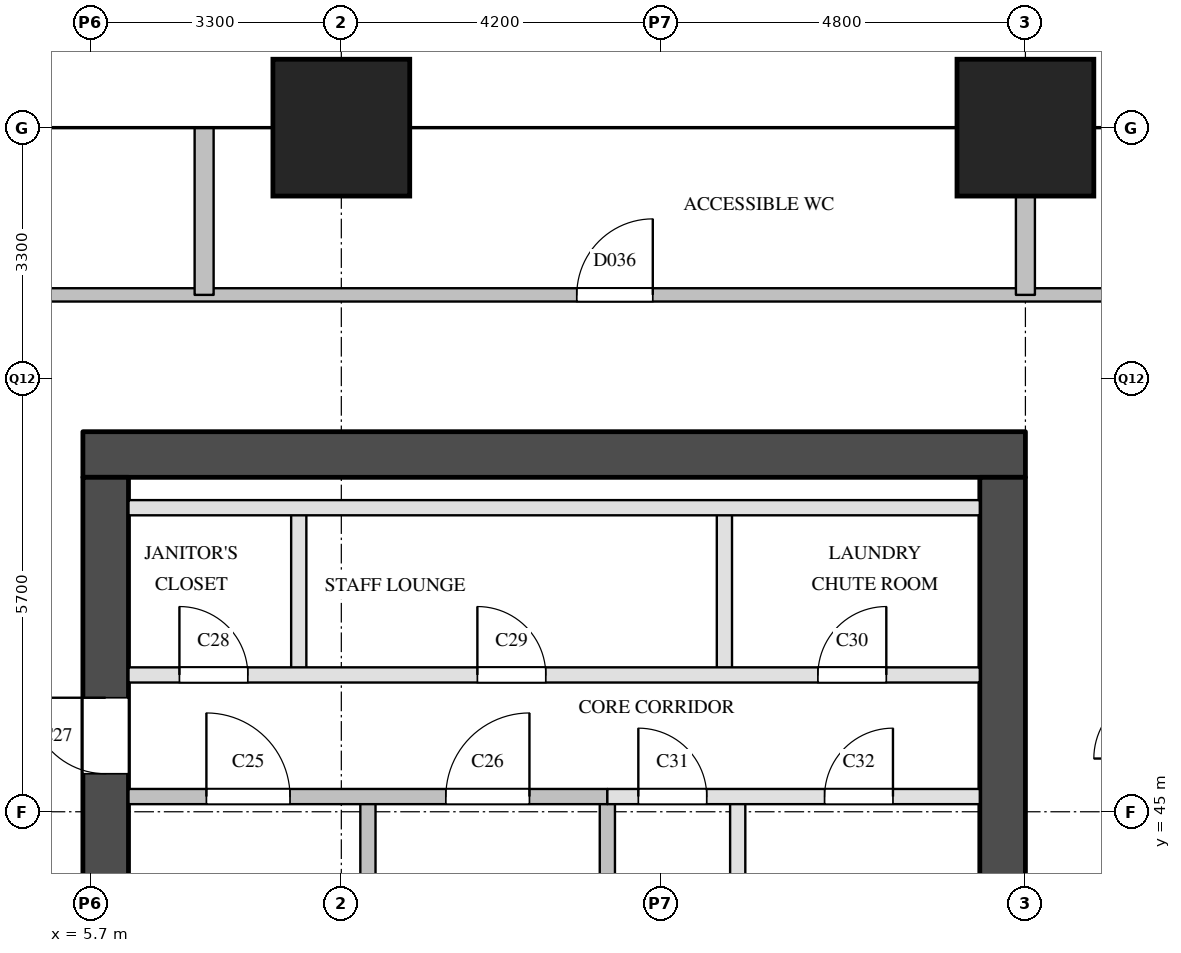
"""IFC4 building model, lengths in metres.
Left out: names, types, materials, properties, quantities, classifications, styles, units other than length and angle.
Written with IfcOpenShell. Run it as: python <this file> out.ifc"""

import sys

from ifc_helpers import new_model, si_unit, direction, frame, frame_2d, origin, origin_2d, place, context, subcontext, project, spatial, rectangle, extrude, element, fill, save


model = new_model("IFC4")
c1 = context("Model", 3, precision=1e-05, world=origin(), true_north=direction((0.0, 1.0)))
c2 = subcontext(c1, "Body", "Model", "MODEL_VIEW")
j1 = project(units=[si_unit("LENGTHUNIT", "METRE"), si_unit("PLANEANGLEUNIT", "RADIAN")], contexts=[c1])
p1 = place(None, origin())
s1 = spatial("IfcSite", under=j1, at=p1, CompositionType="ELEMENT")
p2 = place(p1, origin())
s2 = spatial("IfcBuilding", under=s1, at=p2, CompositionType="ELEMENT")
p3 = place(p2, frame((0.0, 0.0, 112.0)))
s3 = spatial("IfcBuildingStorey", under=s2, at=p3, CompositionType="ELEMENT", Elevation=112.0)
for number, where, z_axis, x_axis in (
    (1, (9.0, 54.0, 0.0), (0.0, 0.0, 1.0), (1.0, 0.0, 0.0)),
    (2, (18.0, 54.0, 0.0), (0.0, 0.0, 1.0), (1.0, 0.0, 0.0)),
):
    element("IfcColumn", number, at=place(p3, frame(where, z_axis=z_axis, x_axis=x_axis)), inside=s3, PredefinedType="COLUMN", context=c2, shape_type="SweptSolid", body=[
        extrude(rectangle(XDim=1.8, YDim=1.8, at=origin_2d()), origin(), (0.0, 0.0, 1.0), 3.8),
    ])
p4 = place(p3, frame((5.6, 49.7, 0.0), z_axis=(0.0, 0.0, 1.0), x_axis=(1.0, 0.0, 0.0)))
e3 = element("IfcWall", 3, at=p4, inside=s3, PredefinedType="SHEAR", context=c2, shape_type="SweptSolid", body=[
    extrude(rectangle(XDim=12.4, YDim=0.6, at=frame_2d((6.2, 0.0))), origin(), (0.0, 0.0, 1.0), 3.5),
])
p5 = place(p3, frame((5.9, 29.1, 0.0), z_axis=(0.0, 0.0, 1.0), x_axis=(0.0, 1.0, 0.0)))
e4 = element("IfcWall", 4, at=p5, inside=s3, PredefinedType="SHEAR", context=c2, shape_type="SweptSolid", body=[
    extrude(rectangle(XDim=20.3, YDim=0.6, at=frame_2d((10.15, 0.0))), origin(), (0.0, 0.0, 1.0), 3.5),
])
p6 = place(p5, frame((3.6, 0.0, 0.0)))
e5 = element("IfcOpeningElement", 5, at=p6, cuts=e4, PredefinedType="OPENING", context=c2, shape_type="SweptSolid", body=[
    extrude(rectangle(XDim=1.8, YDim=2.1, at=frame_2d((0.9, 1.05))), frame((0.0, 0.31, 0.0), z_axis=(0.0, -1.0, 0.0), x_axis=(1.0, 0.0, 0.0)), (0.0, 0.0, 1.0), 0.62),
])
p7 = place(p5, frame((16.4, 0.0, 0.0)))
e6 = element("IfcOpeningElement", 6, at=p7, cuts=e4, PredefinedType="OPENING", context=c2, shape_type="SweptSolid", body=[
    extrude(rectangle(XDim=1.0, YDim=2.1, at=frame_2d((0.5, 1.05))), frame((0.0, 0.31, 0.0), z_axis=(0.0, -1.0, 0.0), x_axis=(1.0, 0.0, 0.0)), (0.0, 0.0, 1.0), 0.62),
])
p8 = place(p3, frame((17.7, 29.1, 0.0), z_axis=(0.0, 0.0, 1.0), x_axis=(0.0, 1.0, 0.0)))
e7 = element("IfcWall", 7, at=p8, inside=s3, PredefinedType="SHEAR", context=c2, shape_type="SweptSolid", body=[
    extrude(rectangle(XDim=20.3, YDim=0.6, at=frame_2d((10.15, 0.0))), origin(), (0.0, 0.0, 1.0), 3.5),
])
p9 = place(p8, frame((1.25, 0.0, 0.0)))
e8 = element("IfcOpeningElement", 8, at=p9, cuts=e7, PredefinedType="OPENING", context=c2, shape_type="SweptSolid", body=[
    extrude(rectangle(XDim=0.7, YDim=2.1, at=frame_2d((0.35, 1.05))), frame((0.0, 0.31, 0.0), z_axis=(0.0, -1.0, 0.0), x_axis=(1.0, 0.0, 0.0)), (0.0, 0.0, 1.0), 0.62),
])
p10 = place(p8, frame((7.05, 0.0, 0.0)))
e9 = element("IfcOpeningElement", 9, at=p10, cuts=e7, PredefinedType="OPENING", context=c2, shape_type="SweptSolid", body=[
    extrude(rectangle(XDim=0.7, YDim=2.1, at=frame_2d((0.35, 1.05))), frame((0.0, 0.31, 0.0), z_axis=(0.0, -1.0, 0.0), x_axis=(1.0, 0.0, 0.0)), (0.0, 0.0, 1.0), 0.62),
])
p11 = place(p3, frame((8.44, 46.8, 0.0), z_axis=(0.0, 0.0, 1.0), x_axis=(0.0, 1.0, 0.0)))
e10 = element("IfcWall", 10, at=p11, inside=s3, PredefinedType="PARTITIONING", context=c2, shape_type="SweptSolid", body=[
    extrude(rectangle(XDim=2.2, YDim=0.2, at=frame_2d((1.1, 0.0))), origin(), (0.0, 0.0, 1.0), 3.5),
])
for number, where, z_axis, x_axis in (
    (11, (9.35, 40.9, 0.0), (0.0, 0.0, 1.0), (0.0, 1.0, 0.0)),
    (12, (12.5, 40.9, 0.0), (0.0, 0.0, 1.0), (0.0, 1.0, 0.0)),
):
    element("IfcWall", number, at=place(p3, frame(where, z_axis=z_axis, x_axis=x_axis)), inside=s3, PredefinedType="SOLIDWALL", context=c2, shape_type="SweptSolid", body=[
        extrude(rectangle(XDim=4.3, YDim=0.2, at=frame_2d((2.15, 0.0))), origin(), (0.0, 0.0, 1.0), 3.5),
    ])
p12 = place(p3, frame((14.04, 46.8, 0.0), z_axis=(0.0, 0.0, 1.0), x_axis=(0.0, 1.0, 0.0)))
e13 = element("IfcWall", 13, at=p12, inside=s3, PredefinedType="PARTITIONING", context=c2, shape_type="SweptSolid", body=[
    extrude(rectangle(XDim=2.2, YDim=0.2, at=frame_2d((1.1, 0.0))), origin(), (0.0, 0.0, 1.0), 3.5),
])
p13 = place(p3, frame((14.215, 39.0, 0.0), z_axis=(0.0, 0.0, 1.0), x_axis=(0.0, 1.0, 0.0)))
e14 = element("IfcWall", 14, at=p13, inside=s3, PredefinedType="PARTITIONING", context=c2, shape_type="SweptSolid", body=[
    extrude(rectangle(XDim=6.2, YDim=0.2, at=frame_2d((3.1, 0.0))), origin(), (0.0, 0.0, 1.0), 3.5),
])
p14 = place(p3, frame((12.5, 45.2, 0.0), z_axis=(0.0, 0.0, 1.0), x_axis=(1.0, 0.0, 0.0)))
e15 = element("IfcWall", 15, at=p14, inside=s3, PredefinedType="PARTITIONING", context=c2, shape_type="SweptSolid", body=[
    extrude(rectangle(XDim=4.9, YDim=0.2, at=frame_2d((2.45, 0.0))), origin(), (0.0, 0.0, 1.0), 3.5),
])
p15 = place(p14, frame((0.407, 0.0, 0.0)))
e16 = element("IfcOpeningElement", 16, at=p15, cuts=e15, PredefinedType="OPENING", context=c2, shape_type="SweptSolid", body=[
    extrude(rectangle(XDim=0.9, YDim=2.1, at=frame_2d((0.45, 1.05))), frame((0.0, 0.11, 0.0), z_axis=(0.0, -1.0, 0.0), x_axis=(1.0, 0.0, 0.0)), (0.0, 0.0, 1.0), 0.22),
])
p16 = place(p14, frame((2.857, 0.0, 0.0)))
e17 = element("IfcOpeningElement", 17, at=p16, cuts=e15, PredefinedType="OPENING", context=c2, shape_type="SweptSolid", body=[
    extrude(rectangle(XDim=0.9, YDim=2.1, at=frame_2d((0.45, 1.05))), frame((0.0, 0.11, 0.0), z_axis=(0.0, -1.0, 0.0), x_axis=(1.0, 0.0, 0.0)), (0.0, 0.0, 1.0), 0.22),
])
p17 = place(p3, frame((6.2, 45.2, 0.0), z_axis=(0.0, 0.0, 1.0), x_axis=(1.0, 0.0, 0.0)))
e18 = element("IfcWall", 18, at=p17, inside=s3, PredefinedType="SOLIDWALL", context=c2, shape_type="SweptSolid", body=[
    extrude(rectangle(XDim=6.3, YDim=0.2, at=frame_2d((3.15, 0.0))), origin(), (0.0, 0.0, 1.0), 3.5),
])
p18 = place(p17, frame((1.025, 0.0, 0.0)))
e19 = element("IfcOpeningElement", 19, at=p18, cuts=e18, PredefinedType="OPENING", context=c2, shape_type="SweptSolid", body=[
    extrude(rectangle(XDim=1.1, YDim=2.1, at=frame_2d((0.55, 1.05))), frame((0.0, 0.11, 0.0), z_axis=(0.0, -1.0, 0.0), x_axis=(1.0, 0.0, 0.0)), (0.0, 0.0, 1.0), 0.22),
])
p19 = place(p17, frame((4.175, 0.0, 0.0)))
e20 = element("IfcOpeningElement", 20, at=p19, cuts=e18, PredefinedType="OPENING", context=c2, shape_type="SweptSolid", body=[
    extrude(rectangle(XDim=1.1, YDim=2.1, at=frame_2d((0.55, 1.05))), frame((0.0, 0.11, 0.0), z_axis=(0.0, -1.0, 0.0), x_axis=(1.0, 0.0, 0.0)), (0.0, 0.0, 1.0), 0.22),
])
p20 = place(p3, frame((6.2, 46.8, 0.0), z_axis=(0.0, 0.0, 1.0), x_axis=(1.0, 0.0, 0.0)))
e21 = element("IfcWall", 21, at=p20, inside=s3, PredefinedType="PARTITIONING", context=c2, shape_type="SweptSolid", body=[
    extrude(rectangle(XDim=11.2, YDim=0.2, at=frame_2d((5.6, 0.0))), origin(), (0.0, 0.0, 1.0), 3.5),
])
p21 = place(p20, frame((0.67, 0.0, 0.0)))
e22 = element("IfcOpeningElement", 22, at=p21, cuts=e21, PredefinedType="OPENING", context=c2, shape_type="SweptSolid", body=[
    extrude(rectangle(XDim=0.9, YDim=2.1, at=frame_2d((0.45, 1.05))), frame((0.0, 0.11, 0.0), z_axis=(0.0, -1.0, 0.0), x_axis=(1.0, 0.0, 0.0)), (0.0, 0.0, 1.0), 0.22),
])
p22 = place(p20, frame((4.59, 0.0, 0.0)))
e23 = element("IfcOpeningElement", 23, at=p22, cuts=e21, PredefinedType="OPENING", context=c2, shape_type="SweptSolid", body=[
    extrude(rectangle(XDim=0.9, YDim=2.1, at=frame_2d((0.45, 1.05))), frame((0.0, 0.11, 0.0), z_axis=(0.0, -1.0, 0.0), x_axis=(1.0, 0.0, 0.0)), (0.0, 0.0, 1.0), 0.22),
])
p23 = place(p20, frame((9.07, 0.0, 0.0)))
e24 = element("IfcOpeningElement", 24, at=p23, cuts=e21, PredefinedType="OPENING", context=c2, shape_type="SweptSolid", body=[
    extrude(rectangle(XDim=0.9, YDim=2.1, at=frame_2d((0.45, 1.05))), frame((0.0, 0.11, 0.0), z_axis=(0.0, -1.0, 0.0), x_axis=(1.0, 0.0, 0.0)), (0.0, 0.0, 1.0), 0.22),
])
p24 = place(p3, frame((6.2, 49.0, 0.0), z_axis=(0.0, 0.0, 1.0), x_axis=(1.0, 0.0, 0.0)))
e25 = element("IfcWall", 25, at=p24, inside=s3, PredefinedType="PARTITIONING", context=c2, shape_type="SweptSolid", body=[
    extrude(rectangle(XDim=11.2, YDim=0.2, at=frame_2d((5.6, 0.0))), origin(), (0.0, 0.0, 1.0), 3.5),
])
p25 = place(p3, frame((3.8, 51.8, 0.0), z_axis=(0.0, 0.0, 1.0), x_axis=(1.0, 0.0, 0.0)))
e26 = element("IfcWall", 26, at=p25, inside=s3, PredefinedType="PARTITIONING", context=c2, shape_type="SweptSolid", body=[
    extrude(rectangle(XDim=16.0, YDim=0.175, at=frame_2d((8.0, 0.0))), origin(), (0.0, 0.0, 1.0), 3.5),
])
p26 = place(p25, frame((8.298, 0.0, 0.0)))
e27 = element("IfcOpeningElement", 27, at=p26, cuts=e26, PredefinedType="OPENING", context=c2, shape_type="SweptSolid", body=[
    extrude(rectangle(XDim=1.0, YDim=2.1, at=frame_2d((0.5, 1.05))), frame((0.0, 0.097, 0.0), z_axis=(0.0, -1.0, 0.0), x_axis=(1.0, 0.0, 0.0)), (0.0, 0.0, 1.0), 0.195),
])
p27 = place(p3, frame((7.195, 51.8, 0.0), z_axis=(0.0, 0.0, 1.0), x_axis=(0.0, 1.0, 0.0)))
e28 = element("IfcWall", 28, at=p27, inside=s3, PredefinedType="PARTITIONING", context=c2, shape_type="SweptSolid", body=[
    extrude(rectangle(XDim=2.2, YDim=0.25, at=frame_2d((1.1, 0.0))), origin(), (0.0, 0.0, 1.0), 2.5),
])
p28 = place(p3, frame((18.0, 51.8, 0.0), z_axis=(0.0, 0.0, 1.0), x_axis=(0.0, 1.0, 0.0)))
e29 = element("IfcWall", 29, at=p28, inside=s3, PredefinedType="PARTITIONING", context=c2, shape_type="SweptSolid", body=[
    extrude(rectangle(XDim=2.2, YDim=0.25, at=frame_2d((1.1, 0.0))), origin(), (0.0, 0.0, 1.0), 3.5),
])
p29 = place(p18, origin())
e30 = element("IfcDoor", 30, at=p29, inside=s3, OperationType="SINGLE_SWING_LEFT", PredefinedType="DOOR", context=c2, shape_type="SweptSolid", body=[
    extrude(rectangle(XDim=1.1, YDim=2.1, at=frame_2d((0.55, 1.05))), frame((0.0, 0.025, 0.0), z_axis=(0.0, -1.0, 0.0), x_axis=(1.0, 0.0, 0.0)), (0.0, 0.0, 1.0), 0.05),
])
fill(e19, e30)
p30 = place(p19, origin())
e31 = element("IfcDoor", 31, at=p30, inside=s3, OperationType="SINGLE_SWING_RIGHT", PredefinedType="DOOR", context=c2, shape_type="SweptSolid", body=[
    extrude(rectangle(XDim=1.1, YDim=2.1, at=frame_2d((0.55, 1.05))), frame((0.0, 0.025, 0.0), z_axis=(0.0, -1.0, 0.0), x_axis=(1.0, 0.0, 0.0)), (0.0, 0.0, 1.0), 0.05),
])
fill(e20, e31)
p31 = place(p7, origin())
e32 = element("IfcDoor", 32, at=p31, inside=s3, OperationType="SINGLE_SWING_RIGHT", PredefinedType="DOOR", context=c2, shape_type="SweptSolid", body=[
    extrude(rectangle(XDim=1.0, YDim=2.1, at=frame_2d((0.5, 1.05))), frame((0.0, 0.025, 0.0), z_axis=(0.0, -1.0, 0.0), x_axis=(1.0, 0.0, 0.0)), (0.0, 0.0, 1.0), 0.05),
])
fill(e6, e32)
p32 = place(p21, origin())
e33 = element("IfcDoor", 33, at=p32, inside=s3, OperationType="SINGLE_SWING_LEFT", PredefinedType="DOOR", context=c2, shape_type="SweptSolid", body=[
    extrude(rectangle(XDim=0.9, YDim=2.1, at=frame_2d((0.45, 1.05))), frame((0.0, 0.025, 0.0), z_axis=(0.0, -1.0, 0.0), x_axis=(1.0, 0.0, 0.0)), (0.0, 0.0, 1.0), 0.05),
])
fill(e22, e33)
p33 = place(p22, origin())
e34 = element("IfcDoor", 34, at=p33, inside=s3, OperationType="SINGLE_SWING_LEFT", PredefinedType="DOOR", context=c2, shape_type="SweptSolid", body=[
    extrude(rectangle(XDim=0.9, YDim=2.1, at=frame_2d((0.45, 1.05))), frame((0.0, 0.025, 0.0), z_axis=(0.0, -1.0, 0.0), x_axis=(1.0, 0.0, 0.0)), (0.0, 0.0, 1.0), 0.05),
])
fill(e23, e34)
p34 = place(p23, origin())
e35 = element("IfcDoor", 35, at=p34, inside=s3, OperationType="SINGLE_SWING_RIGHT", PredefinedType="DOOR", context=c2, shape_type="SweptSolid", body=[
    extrude(rectangle(XDim=0.9, YDim=2.1, at=frame_2d((0.45, 1.05))), frame((0.0, 0.025, 0.0), z_axis=(0.0, -1.0, 0.0), x_axis=(1.0, 0.0, 0.0)), (0.0, 0.0, 1.0), 0.05),
])
fill(e24, e35)
p35 = place(p15, origin())
e36 = element("IfcDoor", 36, at=p35, inside=s3, OperationType="SINGLE_SWING_LEFT", PredefinedType="DOOR", context=c2, shape_type="SweptSolid", body=[
    extrude(rectangle(XDim=0.9, YDim=2.1, at=frame_2d((0.45, 1.05))), frame((0.0, 0.025, 0.0), z_axis=(0.0, -1.0, 0.0), x_axis=(1.0, 0.0, 0.0)), (0.0, 0.0, 1.0), 0.05),
])
fill(e16, e36)
p36 = place(p16, origin())
e37 = element("IfcDoor", 37, at=p36, inside=s3, OperationType="SINGLE_SWING_RIGHT", PredefinedType="DOOR", context=c2, shape_type="SweptSolid", body=[
    extrude(rectangle(XDim=0.9, YDim=2.1, at=frame_2d((0.45, 1.05))), frame((0.0, 0.025, 0.0), z_axis=(0.0, -1.0, 0.0), x_axis=(1.0, 0.0, 0.0)), (0.0, 0.0, 1.0), 0.05),
])
fill(e17, e37)
p37 = place(p26, origin())
e38 = element("IfcDoor", 38, at=p37, inside=s3, OperationType="SINGLE_SWING_RIGHT", PredefinedType="DOOR", context=c2, shape_type="SweptSolid", body=[
    extrude(rectangle(XDim=1.0, YDim=2.1, at=frame_2d((0.5, 1.05))), frame((0.0, 0.025, 0.0), z_axis=(0.0, -1.0, 0.0), x_axis=(1.0, 0.0, 0.0)), (0.0, 0.0, 1.0), 0.05),
])
fill(e27, e38)
save(model, sys.argv[1])
